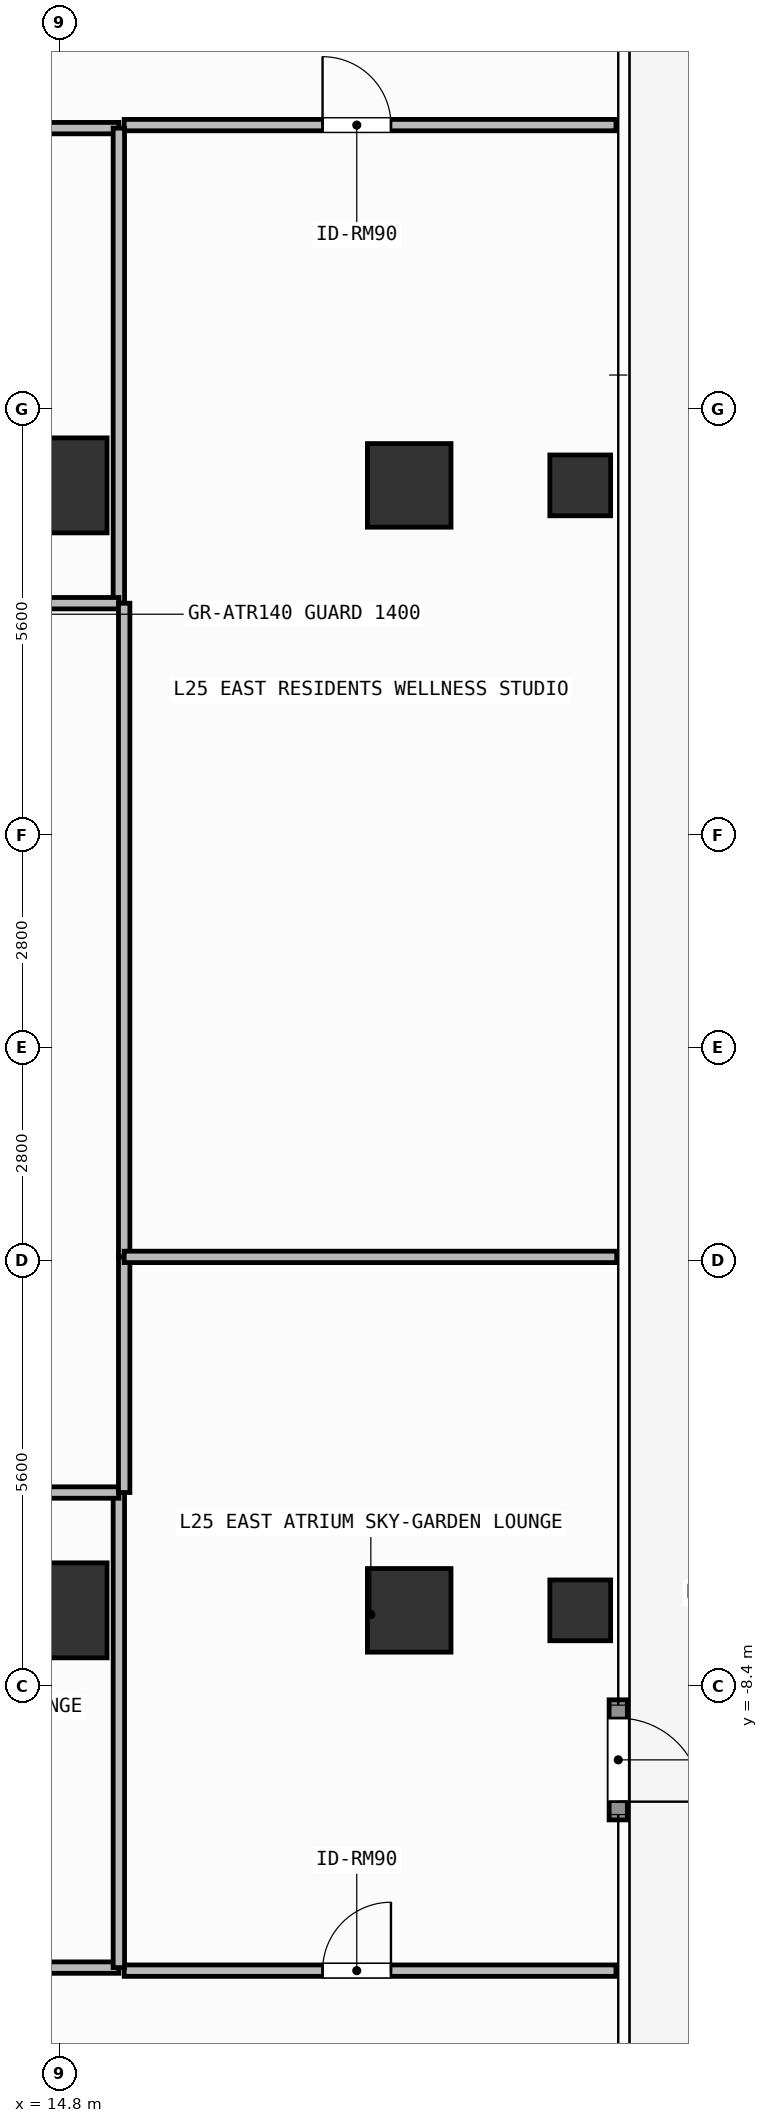
"""IFC4 building model, lengths in metres.
Left out: names, types, materials, properties, quantities, classifications, styles, units other than length and angle.
Written with IfcOpenShell. Run it as: python <this file> out.ifc"""

import sys

from ifc_helpers import new_model, si_unit, direction, frame, frame_2d, origin, origin_2d, place, context, subcontext, project, spatial, rectangle, hollow_rectangle, extrude, element, fill, save


model = new_model("IFC4")
c1 = context("Model", 3, precision=1e-05, world=origin(), true_north=direction((0.0, 1.0)))
c2 = subcontext(c1, "Body", "Model", "MODEL_VIEW")
j1 = project(units=[si_unit("LENGTHUNIT", "METRE"), si_unit("PLANEANGLEUNIT", "RADIAN")], contexts=[c1])
p1 = place(None, origin())
s1 = spatial("IfcSite", under=j1, at=p1, CompositionType="ELEMENT")
p2 = place(p1, origin())
s2 = spatial("IfcBuilding", under=s1, at=p2, CompositionType="ELEMENT")
p3 = place(p2, frame((0.0, 0.0, 100.8)))
s3 = spatial("IfcBuildingStorey", under=s2, at=p3, CompositionType="ELEMENT", Elevation=100.8)
for number, where, z_axis, x_axis in (
    (1, (14.8, -7.4, 0.0), (0.0, 0.0, 1.0), (1.0, 0.0, 0.0)),
    (2, (14.8, 7.4, 0.0), (0.0, 0.0, 1.0), (1.0, 0.0, 0.0)),
):
    element("IfcColumn", number, at=place(p3, frame(where, z_axis=z_axis, x_axis=x_axis)), inside=s3, PredefinedType="COLUMN", context=c2, shape_type="SweptSolid", body=[
        extrude(rectangle(XDim=1.25, YDim=1.25, at=origin_2d()), origin(), (0.0, 0.0, 1.0), 3.9),
    ])
for number, where, z_axis, x_axis in (
    (3, (19.4, -7.4, 0.0), (0.0, 0.0, 1.0), (1.0, 0.0, 0.0)),
    (4, (19.4, 7.4, 0.0), (0.0, 0.0, 1.0), (1.0, 0.0, 0.0)),
):
    element("IfcColumn", number, at=place(p3, frame(where, z_axis=z_axis, x_axis=x_axis)), inside=s3, PredefinedType="COLUMN", context=c2, shape_type="SweptSolid", body=[
        extrude(rectangle(XDim=1.1, YDim=1.1, at=origin_2d()), origin(), (0.0, 0.0, 1.0), 3.9),
    ])
for number, where, z_axis, x_axis in (
    (5, (21.65, -7.4, 0.0), (0.0, 0.0, 1.0), (1.0, 0.0, 0.0)),
    (6, (21.65, 7.4, 0.0), (0.0, 0.0, 1.0), (1.0, 0.0, 0.0)),
):
    element("IfcColumn", number, at=place(p3, frame(where, z_axis=z_axis, x_axis=x_axis)), inside=s3, PredefinedType="COLUMN", context=c2, shape_type="SweptSolid", body=[
        extrude(hollow_rectangle(XDim=0.8, YDim=0.8, WallThickness=0.036, at=origin_2d()), origin(), (0.0, 0.0, 1.0), 3.9),
    ])
p4 = place(p3, frame((22.15, -8.577, 0.0), z_axis=(0.0, 0.0, 1.0), x_axis=(0.0, -1.0, 0.0)))
e7 = element("IfcWall", 7, at=p4, inside=s3, PredefinedType="SOLIDWALL", context=c2, shape_type="SweptSolid", body=[
    extrude(rectangle(XDim=1.58, YDim=0.24, at=frame_2d((0.79, 0.0))), origin(), (0.0, 0.0, 1.0), 3.68),
])
p5 = place(p4, frame((0.24, 0.0, 0.0)))
e8 = element("IfcOpeningElement", 8, at=p5, cuts=e7, PredefinedType="OPENING", context=c2, shape_type="SweptSolid", body=[
    extrude(rectangle(XDim=1.1, YDim=2.2, at=frame_2d((0.55, 1.1))), frame((0.0, 0.13, 0.0), z_axis=(0.0, -1.0, 0.0), x_axis=(1.0, 0.0, 0.0)), (0.0, 0.0, 1.0), 0.26),
])
p6 = place(p3, frame((10.1, -12.1, 0.0), z_axis=(0.0, 0.0, 1.0), x_axis=(1.0, 0.0, 0.0)))
e9 = element("IfcWall", 9, at=p6, inside=s3, PredefinedType="PARTITIONING", context=c2, shape_type="SweptSolid", body=[
    extrude(rectangle(XDim=5.48, YDim=0.15, at=frame_2d((2.74, 0.0))), origin(), (0.0, 0.0, 1.0), 3.68),
])
p7 = place(p6, frame((2.29, 0.0, 0.0)))
e10 = element("IfcOpeningElement", 10, at=p7, cuts=e9, PredefinedType="OPENING", context=c2, shape_type="SweptSolid", body=[
    extrude(rectangle(XDim=0.9, YDim=2.1, at=frame_2d((0.45, 1.05))), frame((0.0, 0.085, 0.0), z_axis=(0.0, -1.0, 0.0), x_axis=(1.0, 0.0, 0.0)), (0.0, 0.0, 1.0), 0.17),
])
p8 = place(p3, frame((8.36, 12.1, 0.0), z_axis=(0.0, 0.0, 1.0), x_axis=(1.0, 0.0, 0.0)))
e11 = element("IfcWall", 11, at=p8, inside=s3, PredefinedType="PARTITIONING", context=c2, shape_type="SweptSolid", body=[
    extrude(rectangle(XDim=7.22, YDim=0.15, at=frame_2d((3.61, 0.0))), origin(), (0.0, 0.0, 1.0), 3.68),
])
p9 = place(p8, frame((3.513, 0.0, 0.0)))
e12 = element("IfcOpeningElement", 12, at=p9, cuts=e11, PredefinedType="OPENING", context=c2, shape_type="SweptSolid", body=[
    extrude(rectangle(XDim=0.9, YDim=2.1, at=frame_2d((0.45, 1.05))), frame((0.0, 0.085, 0.0), z_axis=(0.0, -1.0, 0.0), x_axis=(1.0, 0.0, 0.0)), (0.0, 0.0, 1.0), 0.17),
])
p10 = place(p3, frame((15.65, -12.14, 0.0), z_axis=(0.0, 0.0, 1.0), x_axis=(1.0, 0.0, 0.0)))
e13 = element("IfcWall", 13, at=p10, inside=s3, PredefinedType="PARTITIONING", context=c2, shape_type="SweptSolid", body=[
    extrude(rectangle(XDim=6.47, YDim=0.15, at=frame_2d((3.235, 0.0))), origin(), (0.0, 0.0, 1.0), 3.68),
])
p11 = place(p10, frame((2.61, 0.0, 0.0)))
e14 = element("IfcOpeningElement", 14, at=p11, cuts=e13, PredefinedType="OPENING", context=c2, shape_type="SweptSolid", body=[
    extrude(rectangle(XDim=0.9, YDim=2.1, at=frame_2d((0.45, 1.05))), frame((0.0, 0.085, 0.0), z_axis=(0.0, -1.0, 0.0), x_axis=(1.0, 0.0, 0.0)), (0.0, 0.0, 1.0), 0.17),
])
p12 = place(p3, frame((15.65, 12.14, 0.0), z_axis=(0.0, 0.0, 1.0), x_axis=(1.0, 0.0, 0.0)))
e15 = element("IfcWall", 15, at=p12, inside=s3, PredefinedType="PARTITIONING", context=c2, shape_type="SweptSolid", body=[
    extrude(rectangle(XDim=6.47, YDim=0.15, at=frame_2d((3.235, 0.0))), origin(), (0.0, 0.0, 1.0), 3.68),
])
p13 = place(p12, frame((2.61, 0.0, 0.0)))
e16 = element("IfcOpeningElement", 16, at=p13, cuts=e15, PredefinedType="OPENING", context=c2, shape_type="SweptSolid", body=[
    extrude(rectangle(XDim=0.9, YDim=2.1, at=frame_2d((0.45, 1.05))), frame((0.0, 0.085, 0.0), z_axis=(0.0, -1.0, 0.0), x_axis=(1.0, 0.0, 0.0)), (0.0, 0.0, 1.0), 0.17),
])
p14 = place(p3, frame((15.58, -12.1, 0.0), z_axis=(0.0, 0.0, 1.0), x_axis=(0.0, 1.0, 0.0)))
e17 = element("IfcWall", 17, at=p14, inside=s3, PredefinedType="PARTITIONING", context=c2, shape_type="SweptSolid", body=[
    extrude(rectangle(XDim=6.25, YDim=0.15, at=frame_2d((3.125, 0.0))), origin(), (0.0, 0.0, 1.0), 3.68),
])
p15 = place(p3, frame((8.96, -5.85, 0.0), z_axis=(0.0, 0.0, 1.0), x_axis=(1.0, 0.0, 0.0)))
e18 = element("IfcWall", 18, at=p15, inside=s3, PredefinedType="PARTITIONING", context=c2, shape_type="SweptSolid", body=[
    extrude(rectangle(XDim=6.62, YDim=0.15, at=frame_2d((3.31, 0.0))), origin(), (0.0, 0.0, 1.0), 3.68),
])
p16 = place(p3, frame((15.58, 5.85, 0.0), z_axis=(0.0, 0.0, 1.0), x_axis=(0.0, 1.0, 0.0)))
e19 = element("IfcWall", 19, at=p16, inside=s3, PredefinedType="PARTITIONING", context=c2, shape_type="SweptSolid", body=[
    extrude(rectangle(XDim=6.25, YDim=0.15, at=frame_2d((3.125, 0.0))), origin(), (0.0, 0.0, 1.0), 3.68),
])
p17 = place(p3, frame((8.96, 5.85, 0.0), z_axis=(0.0, 0.0, 1.0), x_axis=(1.0, 0.0, 0.0)))
e20 = element("IfcWall", 20, at=p17, inside=s3, PredefinedType="PARTITIONING", context=c2, shape_type="SweptSolid", body=[
    extrude(rectangle(XDim=6.62, YDim=0.15, at=frame_2d((3.31, 0.0))), origin(), (0.0, 0.0, 1.0), 3.68),
])
p18 = place(p3, frame((15.65, -5.85, 0.0), z_axis=(0.0, 0.0, 1.0), x_axis=(0.0, 1.0, 0.0)))
e21 = element("IfcWall", 21, at=p18, inside=s3, PredefinedType="PARTITIONING", context=c2, shape_type="SweptSolid", body=[
    extrude(rectangle(XDim=3.1, YDim=0.15, at=frame_2d((1.55, 0.0))), origin(), (0.0, 0.0, 1.0), 3.68),
])
p19 = place(p3, frame((15.65, -2.75, 0.0), z_axis=(0.0, 0.0, 1.0), x_axis=(0.0, 1.0, 0.0)))
e22 = element("IfcWall", 22, at=p19, inside=s3, PredefinedType="PARTITIONING", context=c2, shape_type="SweptSolid", body=[
    extrude(rectangle(XDim=8.6, YDim=0.15, at=frame_2d((4.3, 0.0))), origin(), (0.0, 0.0, 1.0), 3.68),
])
p20 = place(p3, frame((15.65, -2.75, 0.0), z_axis=(0.0, 0.0, 1.0), x_axis=(1.0, 0.0, 0.0)))
e23 = element("IfcWall", 23, at=p20, inside=s3, PredefinedType="PARTITIONING", context=c2, shape_type="SweptSolid", body=[
    extrude(rectangle(XDim=6.48, YDim=0.15, at=frame_2d((3.24, 0.0))), origin(), (0.0, 0.0, 1.0), 3.68),
])
p21 = place(p5, origin())
e24 = element("IfcDoor", 24, at=p21, inside=s3, OperationType="SINGLE_SWING_RIGHT", PredefinedType="DOOR", context=c2, shape_type="SweptSolid", body=[
    extrude(rectangle(XDim=1.1, YDim=2.2, at=frame_2d((0.55, 1.1))), frame((0.0, 0.025, 0.0), z_axis=(0.0, -1.0, 0.0), x_axis=(1.0, 0.0, 0.0)), (0.0, 0.0, 1.0), 0.05),
])
fill(e8, e24)
p22 = place(p11, origin())
e25 = element("IfcDoor", 25, at=p22, inside=s3, OperationType="SINGLE_SWING_RIGHT", PredefinedType="DOOR", context=c2, shape_type="SweptSolid", body=[
    extrude(rectangle(XDim=0.9, YDim=2.1, at=frame_2d((0.45, 1.05))), frame((0.0, 0.025, 0.0), z_axis=(0.0, -1.0, 0.0), x_axis=(1.0, 0.0, 0.0)), (0.0, 0.0, 1.0), 0.05),
])
fill(e14, e25)
p23 = place(p13, origin())
e26 = element("IfcDoor", 26, at=p23, inside=s3, OperationType="SINGLE_SWING_LEFT", PredefinedType="DOOR", context=c2, shape_type="SweptSolid", body=[
    extrude(rectangle(XDim=0.9, YDim=2.1, at=frame_2d((0.45, 1.05))), frame((0.0, 0.025, 0.0), z_axis=(0.0, -1.0, 0.0), x_axis=(1.0, 0.0, 0.0)), (0.0, 0.0, 1.0), 0.05),
])
fill(e16, e26)
save(model, sys.argv[1])
